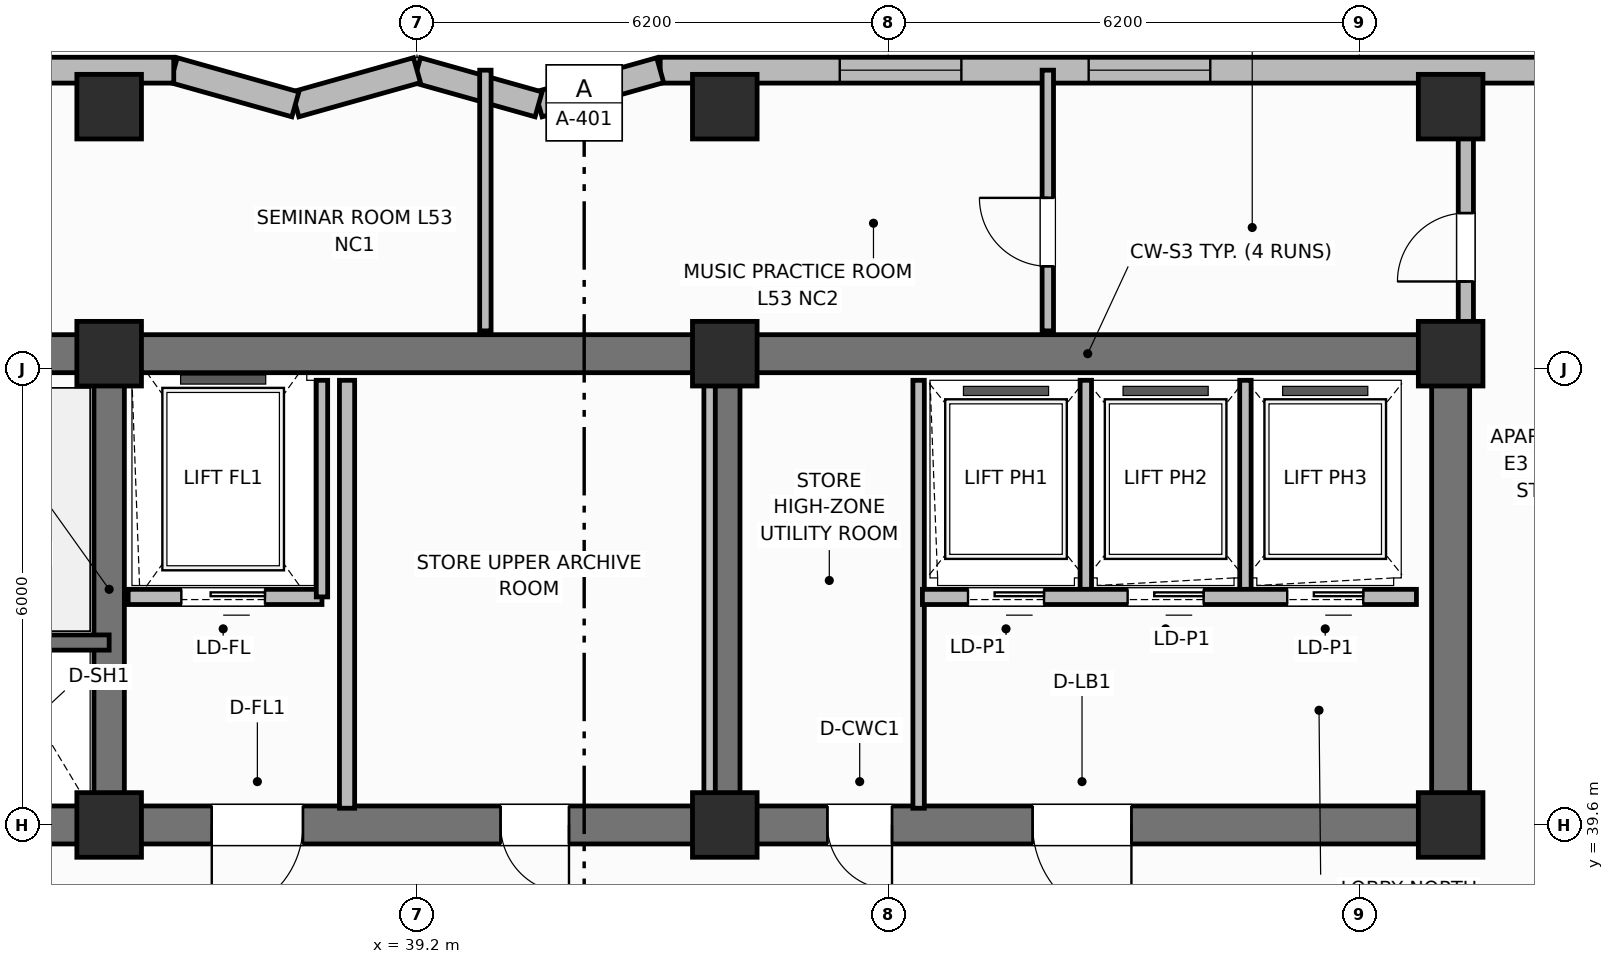
"""IFC4 building model, lengths in metres.
Left out: names, types, materials, properties, quantities, classifications, styles, units other than length and angle.
Written with IfcOpenShell. Run it as: python <this file> out.ifc"""

import sys

from ifc_helpers import new_model, si_unit, direction, frame, frame_2d, origin, origin_2d, place, context, subcontext, project, spatial, rectangle, extrude, element, fill, save


model = new_model("IFC4")
c1 = context("Model", 3, precision=1e-05, world=origin(), true_north=direction((0.0, 1.0)))
c2 = subcontext(c1, "Body", "Model", "MODEL_VIEW")
j1 = project(units=[si_unit("LENGTHUNIT", "METRE"), si_unit("PLANEANGLEUNIT", "RADIAN")], contexts=[c1])
p1 = place(None, origin())
s1 = spatial("IfcSite", under=j1, at=p1, CompositionType="ELEMENT")
p2 = place(p1, origin())
s2 = spatial("IfcBuilding", under=s1, at=p2, CompositionType="ELEMENT")
p3 = place(p2, frame((0.0, 0.0, 214.7)))
s3 = spatial("IfcBuildingStorey", under=s2, at=p3, CompositionType="ELEMENT", Elevation=214.7)
p4 = place(p3, frame((25.6, 45.8, 0.0), z_axis=(0.0, 0.0, 1.0), x_axis=(1.0, 0.0, 0.0)))
e1 = element("IfcWall", 1, at=p4, inside=s3, PredefinedType="SHEAR", context=c2, shape_type="SweptSolid", body=[
    extrude(rectangle(XDim=27.2, YDim=0.5, at=frame_2d((13.6, 0.0))), origin(), (0.0, 0.0, 1.0), 3.7),
])
p5 = place(p3, frame((52.8, 39.85, 0.0), z_axis=(0.0, 0.0, 1.0), x_axis=(0.0, 1.0, 0.0)))
e2 = element("IfcWall", 2, at=p5, inside=s3, PredefinedType="SHEAR", context=c2, shape_type="SweptSolid", body=[
    extrude(rectangle(XDim=5.7, YDim=0.5, at=frame_2d((2.85, 0.0))), origin(), (0.0, 0.0, 1.0), 3.7),
])
p6 = place(p3, frame((52.8, 39.6, 0.0), z_axis=(0.0, 0.0, 1.0), x_axis=(-1.0, 0.0, 0.0)))
e3 = element("IfcWall", 3, at=p6, inside=s3, PredefinedType="SHEAR", context=c2, shape_type="SweptSolid", body=[
    extrude(rectangle(XDim=27.2, YDim=0.5, at=frame_2d((13.6, 0.0))), origin(), (0.0, 0.0, 1.0), 3.7),
])
p7 = place(p6, frame((24.2, 0.0, 0.0)))
e4 = element("IfcOpeningElement", 4, at=p7, cuts=e3, PredefinedType="OPENING", context=c2, shape_type="SweptSolid", body=[
    extrude(rectangle(XDim=1.1, YDim=2.15, at=frame_2d((0.55, 1.075))), frame((0.0, 0.26, 0.0), z_axis=(0.0, -1.0, 0.0), x_axis=(1.0, 0.0, 0.0)), (0.0, 0.0, 1.0), 0.52),
])
p8 = place(p6, frame((15.1, 0.0, 0.0)))
e5 = element("IfcOpeningElement", 5, at=p8, cuts=e3, PredefinedType="OPENING", context=c2, shape_type="SweptSolid", body=[
    extrude(rectangle(XDim=1.2, YDim=2.15, at=frame_2d((0.6, 1.075))), frame((0.0, 0.26, 0.0), z_axis=(0.0, -1.0, 0.0), x_axis=(1.0, 0.0, 0.0)), (0.0, 0.0, 1.0), 0.52),
])
p9 = place(p6, frame((11.6, 0.0, 0.0)))
e6 = element("IfcOpeningElement", 6, at=p9, cuts=e3, PredefinedType="OPENING", context=c2, shape_type="SweptSolid", body=[
    extrude(rectangle(XDim=0.9, YDim=2.1, at=frame_2d((0.45, 1.05))), frame((0.0, 0.26, 0.0), z_axis=(0.0, -1.0, 0.0), x_axis=(1.0, 0.0, 0.0)), (0.0, 0.0, 1.0), 0.52),
])
p10 = place(p6, frame((7.35, 0.0, 0.0)))
e7 = element("IfcOpeningElement", 7, at=p10, cuts=e3, PredefinedType="OPENING", context=c2, shape_type="SweptSolid", body=[
    extrude(rectangle(XDim=0.85, YDim=2.1, at=frame_2d((0.425, 1.05))), frame((0.0, 0.26, 0.0), z_axis=(0.0, -1.0, 0.0), x_axis=(1.0, 0.0, 0.0)), (0.0, 0.0, 1.0), 0.52),
])
p11 = place(p6, frame((4.2, 0.0, 0.0)))
e8 = element("IfcOpeningElement", 8, at=p11, cuts=e3, PredefinedType="OPENING", context=c2, shape_type="SweptSolid", body=[
    extrude(rectangle(XDim=1.3, YDim=2.2, at=frame_2d((0.65, 1.1))), frame((0.0, 0.26, 0.0), z_axis=(0.0, -1.0, 0.0), x_axis=(1.0, 0.0, 0.0)), (0.0, 0.0, 1.0), 0.52),
])
for number, where, z_axis, x_axis in (
    (9, (35.15, 39.85, 0.0), (0.0, 0.0, 1.0), (0.0, 1.0, 0.0)),
    (10, (43.25, 39.85, 0.0), (0.0, 0.0, 1.0), (0.0, 1.0, 0.0)),
):
    element("IfcWall", number, at=place(p3, frame(where, z_axis=z_axis, x_axis=x_axis)), inside=s3, PredefinedType="SHEAR", context=c2, shape_type="SweptSolid", body=[
        extrude(rectangle(XDim=5.7, YDim=0.4, at=frame_2d((2.85, 0.0))), origin(), (0.0, 0.0, 1.0), 3.7),
    ])
for number, where, z_axis, x_axis in (
    (11, (35.15, 39.6, 0.0), (0.0, 0.0, 1.0), (1.0, 0.0, 0.0)),
    (12, (35.15, 45.8, 0.0), (0.0, 0.0, 1.0), (1.0, 0.0, 0.0)),
    (13, (43.25, 39.6, 0.0), (0.0, 0.0, 1.0), (1.0, 0.0, 0.0)),
    (14, (43.25, 45.8, 0.0), (0.0, 0.0, 1.0), (1.0, 0.0, 0.0)),
    (15, (52.8, 39.6, 0.0), (0.0, 0.0, 1.0), (1.0, 0.0, 0.0)),
    (16, (52.8, 45.8, 0.0), (0.0, 0.0, 1.0), (1.0, 0.0, 0.0)),
    (17, (35.15, 49.05, 0.0), (0.0, 0.0, 1.0), (1.0, 0.0, 0.0)),
    (18, (43.25, 49.05, 0.0), (0.0, 0.0, 1.0), (1.0, 0.0, 0.0)),
    (19, (52.8, 49.05, 0.0), (0.0, 0.0, 1.0), (1.0, 0.0, 0.0)),
):
    element("IfcColumn", number, at=place(p3, frame(where, z_axis=z_axis, x_axis=x_axis)), inside=s3, PredefinedType="COLUMN", context=c2, shape_type="SweptSolid", body=[
        extrude(rectangle(XDim=0.85, YDim=0.85, at=origin_2d()), origin(), (0.0, 0.0, 1.0), 3.7),
    ])
p12 = place(p3, frame((58.2, 49.53, 0.0), z_axis=(0.0, 0.0, 1.0), x_axis=(-1.0, 0.0, 0.0)))
e20 = element("IfcWall", 20, at=p12, inside=s3, PredefinedType="SOLIDWALL", context=c2, shape_type="SweptSolid", body=[
    extrude(rectangle(XDim=15.8, YDim=0.34, at=frame_2d((7.9, 0.0))), origin(), (0.0, 0.0, 1.0), 2.72),
])
p13 = place(p12, frame((0.962, 0.0, 0.7)))
e21 = element("IfcOpeningElement", 21, at=p13, cuts=e20, PredefinedType="OPENING", context=c2, shape_type="SweptSolid", body=[
    extrude(rectangle(XDim=1.6, YDim=1.9, at=frame_2d((0.8, 0.95))), frame((0.0, 0.18, 0.0), z_axis=(0.0, -1.0, 0.0), x_axis=(1.0, 0.0, 0.0)), (0.0, 0.0, 1.0), 0.36),
])
p14 = place(p12, frame((8.562, 0.0, 0.7)))
e22 = element("IfcOpeningElement", 22, at=p14, cuts=e20, PredefinedType="OPENING", context=c2, shape_type="SweptSolid", body=[
    extrude(rectangle(XDim=1.6, YDim=1.9, at=frame_2d((0.8, 0.95))), frame((0.0, 0.18, 0.0), z_axis=(0.0, -1.0, 0.0), x_axis=(1.0, 0.0, 0.0)), (0.0, 0.0, 1.0), 0.36),
])
p15 = place(p12, frame((11.837, 0.0, 0.7)))
e23 = element("IfcOpeningElement", 23, at=p15, cuts=e20, PredefinedType="OPENING", context=c2, shape_type="SweptSolid", body=[
    extrude(rectangle(XDim=1.6, YDim=1.9, at=frame_2d((0.8, 0.95))), frame((0.0, 0.18, 0.0), z_axis=(0.0, -1.0, 0.0), x_axis=(1.0, 0.0, 0.0)), (0.0, 0.0, 1.0), 0.36),
])
p16 = place(p3, frame((42.4, 49.53, 0.0), z_axis=(0.0, 0.0, 1.0), x_axis=(-0.962652136636, -0.270741322725, 0.0)))
e24 = element("IfcWall", 24, at=p16, inside=s3, PredefinedType="SOLIDWALL", context=c2, shape_type="SweptSolid", body=[
    extrude(rectangle(XDim=1.662, YDim=0.34, at=frame_2d((0.831, 0.0))), origin(), (0.0, 0.0, 1.0), 2.72),
])
p17 = place(p3, frame((40.8, 49.08, 0.0), z_axis=(0.0, 0.0, 1.0), x_axis=(-0.962662902433, 0.270703040766, 0.0)))
e25 = element("IfcWall", 25, at=p17, inside=s3, PredefinedType="SOLIDWALL", context=c2, shape_type="SweptSolid", body=[
    extrude(rectangle(XDim=1.662, YDim=0.34, at=frame_2d((0.831, 0.0))), origin(), (0.0, 0.0, 1.0), 2.72),
])
p18 = place(p3, frame((39.2, 49.53, 0.0), z_axis=(0.0, 0.0, 1.0), x_axis=(-0.962652136636, -0.270741322725, 0.0)))
e26 = element("IfcWall", 26, at=p18, inside=s3, PredefinedType="SOLIDWALL", context=c2, shape_type="SweptSolid", body=[
    extrude(rectangle(XDim=1.662, YDim=0.34, at=frame_2d((0.831, 0.0))), origin(), (0.0, 0.0, 1.0), 2.72),
])
p19 = place(p3, frame((37.6, 49.08, 0.0), z_axis=(0.0, 0.0, 1.0), x_axis=(-0.962662902433, 0.270703040766, 0.0)))
e27 = element("IfcWall", 27, at=p19, inside=s3, PredefinedType="SOLIDWALL", context=c2, shape_type="SweptSolid", body=[
    extrude(rectangle(XDim=1.662, YDim=0.34, at=frame_2d((0.831, 0.0))), origin(), (0.0, 0.0, 1.0), 2.72),
])
p20 = place(p3, frame((36.0, 49.53, 0.0), z_axis=(0.0, 0.0, 1.0), x_axis=(-1.0, 0.0, 0.0)))
e28 = element("IfcWall", 28, at=p20, inside=s3, PredefinedType="SOLIDWALL", context=c2, shape_type="SweptSolid", body=[
    extrude(rectangle(XDim=15.8, YDim=0.34, at=frame_2d((7.9, 0.0))), origin(), (0.0, 0.0, 1.0), 2.72),
])
p21 = place(p20, frame((2.363, 0.0, 0.7)))
e29 = element("IfcOpeningElement", 29, at=p21, cuts=e28, PredefinedType="OPENING", context=c2, shape_type="SweptSolid", body=[
    extrude(rectangle(XDim=1.6, YDim=1.9, at=frame_2d((0.8, 0.95))), frame((0.0, 0.18, 0.0), z_axis=(0.0, -1.0, 0.0), x_axis=(1.0, 0.0, 0.0)), (0.0, 0.0, 1.0), 0.36),
])
p22 = place(p20, frame((5.288, 0.0, 0.7)))
e30 = element("IfcOpeningElement", 30, at=p22, cuts=e28, PredefinedType="OPENING", context=c2, shape_type="SweptSolid", body=[
    extrude(rectangle(XDim=1.6, YDim=1.9, at=frame_2d((0.8, 0.95))), frame((0.0, 0.18, 0.0), z_axis=(0.0, -1.0, 0.0), x_axis=(1.0, 0.0, 0.0)), (0.0, 0.0, 1.0), 0.36),
])
p23 = place(p20, frame((13.238, 0.0, 0.7)))
e31 = element("IfcOpeningElement", 31, at=p23, cuts=e28, PredefinedType="OPENING", context=c2, shape_type="SweptSolid", body=[
    extrude(rectangle(XDim=1.6, YDim=1.9, at=frame_2d((0.8, 0.95))), frame((0.0, 0.18, 0.0), z_axis=(0.0, -1.0, 0.0), x_axis=(1.0, 0.0, 0.0)), (0.0, 0.0, 1.0), 0.36),
])
p24 = place(p3, frame((35.15, 42.0, 0.0), z_axis=(0.0, 0.0, 1.0), x_axis=(-1.0, 0.0, 0.0)))
e32 = element("IfcWall", 32, at=p24, inside=s3, PredefinedType="SHEAR", context=c2, shape_type="SweptSolid", body=[
    extrude(rectangle(XDim=9.55, YDim=0.2, at=frame_2d((4.775, 0.0))), origin(), (0.0, 0.0, 1.0), 3.7),
])
p25 = place(p24, frame((7.25, 0.0, 0.0)))
e33 = element("IfcOpeningElement", 33, at=p25, cuts=e32, PredefinedType="OPENING", context=c2, shape_type="SweptSolid", body=[
    extrude(rectangle(XDim=1.1, YDim=2.15, at=frame_2d((0.55, 1.075))), frame((0.0, 0.11, 0.0), z_axis=(0.0, -1.0, 0.0), x_axis=(1.0, 0.0, 0.0)), (0.0, 0.0, 1.0), 0.22),
])
p26 = place(p3, frame((37.95, 42.6, 0.0), z_axis=(0.0, 0.0, 1.0), x_axis=(-1.0, 0.0, 0.0)))
e34 = element("IfcWall", 34, at=p26, inside=s3, PredefinedType="PARTITIONING", context=c2, shape_type="SweptSolid", body=[
    extrude(rectangle(XDim=2.55, YDim=0.2, at=frame_2d((1.275, 0.0))), origin(), (0.0, 0.0, 1.0), 2.32),
])
p27 = place(p26, frame((0.75, 0.0, 0.0)))
e35 = element("IfcOpeningElement", 35, at=p27, cuts=e34, PredefinedType="OPENING", context=c2, shape_type="SweptSolid", body=[
    extrude(rectangle(XDim=1.1, YDim=2.15, at=frame_2d((0.55, 1.075))), frame((0.0, 0.11, 0.0), z_axis=(0.0, -1.0, 0.0), x_axis=(1.0, 0.0, 0.0)), (0.0, 0.0, 1.0), 0.22),
])
p28 = place(p3, frame((37.95, 42.6, 0.0), z_axis=(0.0, 0.0, 1.0), x_axis=(0.0, 1.0, 0.0)))
e36 = element("IfcWall", 36, at=p28, inside=s3, PredefinedType="PARTITIONING", context=c2, shape_type="SweptSolid", body=[
    extrude(rectangle(XDim=2.85, YDim=0.15, at=frame_2d((1.425, 0.0))), origin(), (0.0, 0.0, 1.0), 2.55),
])
p29 = place(p3, frame((38.28, 39.82, 0.0), z_axis=(0.0, 0.0, 1.0), x_axis=(0.0, 1.0, 0.0)))
e37 = element("IfcWall", 37, at=p29, inside=s3, PredefinedType="PARTITIONING", context=c2, shape_type="SweptSolid", body=[
    extrude(rectangle(XDim=5.63, YDim=0.2, at=frame_2d((2.815, 0.0))), origin(), (0.0, 0.0, 1.0), 2.55),
])
for number, where, z_axis, x_axis in (
    (38, (43.05, 39.82, 0.0), (0.0, 0.0, 1.0), (0.0, 1.0, 0.0)),
    (39, (45.8, 39.82, 0.0), (0.0, 0.0, 1.0), (0.0, 1.0, 0.0)),
):
    element("IfcWall", number, at=place(p3, frame(where, z_axis=z_axis, x_axis=x_axis)), inside=s3, PredefinedType="PARTITIONING", context=c2, shape_type="SweptSolid", body=[
        extrude(rectangle(XDim=5.63, YDim=0.15, at=frame_2d((2.815, 0.0))), origin(), (0.0, 0.0, 1.0), 2.55),
    ])
for number, where, z_axis, x_axis in (
    (40, (48.0, 42.65, 0.0), (0.0, 0.0, 1.0), (0.0, 1.0, 0.0)),
    (41, (50.1, 42.65, 0.0), (0.0, 0.0, 1.0), (0.0, 1.0, 0.0)),
):
    element("IfcWall", number, at=place(p3, frame(where, z_axis=z_axis, x_axis=x_axis)), inside=s3, PredefinedType="PARTITIONING", context=c2, shape_type="SweptSolid", body=[
        extrude(rectangle(XDim=2.8, YDim=0.15, at=frame_2d((1.4, 0.0))), origin(), (0.0, 0.0, 1.0), 2.55),
    ])
p30 = place(p3, frame((52.35, 42.6, 0.0), z_axis=(0.0, 0.0, 1.0), x_axis=(-1.0, 0.0, 0.0)))
e42 = element("IfcWall", 42, at=p30, inside=s3, PredefinedType="PARTITIONING", context=c2, shape_type="SweptSolid", body=[
    extrude(rectangle(XDim=6.5, YDim=0.2, at=frame_2d((3.25, 0.0))), origin(), (0.0, 0.0, 1.0), 2.55),
])
p31 = place(p30, frame((4.9, 0.0, 0.0)))
e43 = element("IfcOpeningElement", 43, at=p31, cuts=e42, PredefinedType="OPENING", context=c2, shape_type="SweptSolid", body=[
    extrude(rectangle(XDim=1.0, YDim=2.15, at=frame_2d((0.5, 1.075))), frame((0.0, 0.11, 0.0), z_axis=(0.0, -1.0, 0.0), x_axis=(1.0, 0.0, 0.0)), (0.0, 0.0, 1.0), 0.22),
])
p32 = place(p30, frame((2.8, 0.0, 0.0)))
e44 = element("IfcOpeningElement", 44, at=p32, cuts=e42, PredefinedType="OPENING", context=c2, shape_type="SweptSolid", body=[
    extrude(rectangle(XDim=1.0, YDim=2.15, at=frame_2d((0.5, 1.075))), frame((0.0, 0.11, 0.0), z_axis=(0.0, -1.0, 0.0), x_axis=(1.0, 0.0, 0.0)), (0.0, 0.0, 1.0), 0.22),
])
p33 = place(p30, frame((0.7, 0.0, 0.0)))
e45 = element("IfcOpeningElement", 45, at=p33, cuts=e42, PredefinedType="OPENING", context=c2, shape_type="SweptSolid", body=[
    extrude(rectangle(XDim=1.0, YDim=2.15, at=frame_2d((0.5, 1.075))), frame((0.0, 0.11, 0.0), z_axis=(0.0, -1.0, 0.0), x_axis=(1.0, 0.0, 0.0)), (0.0, 0.0, 1.0), 0.22),
])
p34 = place(p3, frame((40.1, 46.1, 0.0), z_axis=(0.0, 0.0, 1.0), x_axis=(0.0, 1.0, 0.0)))
e46 = element("IfcWall", 46, at=p34, inside=s3, PredefinedType="PARTITIONING", context=c2, shape_type="SweptSolid", body=[
    extrude(rectangle(XDim=3.43, YDim=0.15, at=frame_2d((1.715, 0.0))), origin(), (0.0, 0.0, 1.0), 2.55),
])
p35 = place(p3, frame((47.5, 46.1, 0.0), z_axis=(0.0, 0.0, 1.0), x_axis=(0.0, 1.0, 0.0)))
e47 = element("IfcWall", 47, at=p35, inside=s3, PredefinedType="PARTITIONING", context=c2, shape_type="SweptSolid", body=[
    extrude(rectangle(XDim=3.43, YDim=0.15, at=frame_2d((1.715, 0.0))), origin(), (0.0, 0.0, 1.0), 2.55),
])
p36 = place(p35, frame((0.85, 0.0, 0.0)))
e48 = element("IfcOpeningElement", 48, at=p36, cuts=e47, PredefinedType="OPENING", context=c2, shape_type="SweptSolid", body=[
    extrude(rectangle(XDim=0.9, YDim=2.1, at=frame_2d((0.45, 1.05))), frame((0.0, 0.085, 0.0), z_axis=(0.0, -1.0, 0.0), x_axis=(1.0, 0.0, 0.0)), (0.0, 0.0, 1.0), 0.17),
])
p37 = place(p3, frame((53.0, 46.1, 0.0), z_axis=(0.0, 0.0, 1.0), x_axis=(0.0, 1.0, 0.0)))
e49 = element("IfcWall", 49, at=p37, inside=s3, PredefinedType="PARTITIONING", context=c2, shape_type="SweptSolid", body=[
    extrude(rectangle(XDim=2.73, YDim=0.2, at=frame_2d((1.365, 0.0))), origin(), (0.0, 0.0, 1.0), 2.55),
])
p38 = place(p37, frame((0.65, 0.0, 0.0)))
e50 = element("IfcOpeningElement", 50, at=p38, cuts=e49, PredefinedType="OPENING", context=c2, shape_type="SweptSolid", body=[
    extrude(rectangle(XDim=0.9, YDim=2.1, at=frame_2d((0.45, 1.05))), frame((0.0, 0.11, 0.0), z_axis=(0.0, -1.0, 0.0), x_axis=(1.0, 0.0, 0.0)), (0.0, 0.0, 1.0), 0.22),
])
p39 = place(p14, origin())
e51 = element("IfcWindow", 51, at=p39, inside=s3, PartitioningType="SINGLE_PANEL", PredefinedType="WINDOW", context=c2, shape_type="SweptSolid", body=[
    extrude(rectangle(XDim=1.6, YDim=1.9, at=frame_2d((0.8, 0.95))), frame((0.0, 0.03, 0.0), z_axis=(0.0, -1.0, 0.0), x_axis=(1.0, 0.0, 0.0)), (0.0, 0.0, 1.0), 0.06),
])
fill(e22, e51)
p40 = place(p15, origin())
e52 = element("IfcWindow", 52, at=p40, inside=s3, PartitioningType="SINGLE_PANEL", PredefinedType="WINDOW", context=c2, shape_type="SweptSolid", body=[
    extrude(rectangle(XDim=1.6, YDim=1.9, at=frame_2d((0.8, 0.95))), frame((0.0, 0.03, 0.0), z_axis=(0.0, -1.0, 0.0), x_axis=(1.0, 0.0, 0.0)), (0.0, 0.0, 1.0), 0.06),
])
fill(e23, e52)
p41 = place(p27, origin())
e53 = element("IfcDoor", 53, at=p41, inside=s3, OperationType="SLIDING_TO_LEFT", PredefinedType="DOOR", context=c2, shape_type="SweptSolid", body=[
    extrude(rectangle(XDim=1.1, YDim=2.15, at=frame_2d((0.55, 1.075))), frame((0.0, 0.025, 0.0), z_axis=(0.0, -1.0, 0.0), x_axis=(1.0, 0.0, 0.0)), (0.0, 0.0, 1.0), 0.05),
])
fill(e35, e53)
p42 = place(p31, origin())
e54 = element("IfcDoor", 54, at=p42, inside=s3, OperationType="SLIDING_TO_LEFT", PredefinedType="DOOR", context=c2, shape_type="SweptSolid", body=[
    extrude(rectangle(XDim=1.0, YDim=2.15, at=frame_2d((0.5, 1.075))), frame((0.0, 0.025, 0.0), z_axis=(0.0, -1.0, 0.0), x_axis=(1.0, 0.0, 0.0)), (0.0, 0.0, 1.0), 0.05),
])
fill(e43, e54)
p43 = place(p32, origin())
e55 = element("IfcDoor", 55, at=p43, inside=s3, OperationType="SLIDING_TO_LEFT", PredefinedType="DOOR", context=c2, shape_type="SweptSolid", body=[
    extrude(rectangle(XDim=1.0, YDim=2.15, at=frame_2d((0.5, 1.075))), frame((0.0, 0.025, 0.0), z_axis=(0.0, -1.0, 0.0), x_axis=(1.0, 0.0, 0.0)), (0.0, 0.0, 1.0), 0.05),
])
fill(e44, e55)
p44 = place(p33, origin())
e56 = element("IfcDoor", 56, at=p44, inside=s3, OperationType="SLIDING_TO_LEFT", PredefinedType="DOOR", context=c2, shape_type="SweptSolid", body=[
    extrude(rectangle(XDim=1.0, YDim=2.15, at=frame_2d((0.5, 1.075))), frame((0.0, 0.025, 0.0), z_axis=(0.0, -1.0, 0.0), x_axis=(1.0, 0.0, 0.0)), (0.0, 0.0, 1.0), 0.05),
])
fill(e45, e56)
p45 = place(p36, origin())
e57 = element("IfcDoor", 57, at=p45, inside=s3, OperationType="SINGLE_SWING_RIGHT", PredefinedType="DOOR", context=c2, shape_type="SweptSolid", body=[
    extrude(rectangle(XDim=0.9, YDim=2.1, at=frame_2d((0.45, 1.05))), frame((0.0, 0.025, 0.0), z_axis=(0.0, -1.0, 0.0), x_axis=(1.0, 0.0, 0.0)), (0.0, 0.0, 1.0), 0.05),
])
fill(e48, e57)
p46 = place(p38, origin())
e58 = element("IfcDoor", 58, at=p46, inside=s3, OperationType="SINGLE_SWING_LEFT", PredefinedType="DOOR", context=c2, shape_type="SweptSolid", body=[
    extrude(rectangle(XDim=0.9, YDim=2.1, at=frame_2d((0.45, 1.05))), frame((0.0, 0.025, 0.0), z_axis=(0.0, -1.0, 0.0), x_axis=(1.0, 0.0, 0.0)), (0.0, 0.0, 1.0), 0.05),
])
fill(e50, e58)
p47 = place(p8, origin())
e59 = element("IfcDoor", 59, at=p47, inside=s3, OperationType="SINGLE_SWING_RIGHT", PredefinedType="DOOR", context=c2, shape_type="SweptSolid", body=[
    extrude(rectangle(XDim=1.2, YDim=2.15, at=frame_2d((0.6, 1.075))), frame((0.0, 0.025, 0.0), z_axis=(0.0, -1.0, 0.0), x_axis=(1.0, 0.0, 0.0)), (0.0, 0.0, 1.0), 0.05),
])
fill(e5, e59)
p48 = place(p9, origin())
e60 = element("IfcDoor", 60, at=p48, inside=s3, OperationType="SINGLE_SWING_LEFT", PredefinedType="DOOR", context=c2, shape_type="SweptSolid", body=[
    extrude(rectangle(XDim=0.9, YDim=2.1, at=frame_2d((0.45, 1.05))), frame((0.0, 0.025, 0.0), z_axis=(0.0, -1.0, 0.0), x_axis=(1.0, 0.0, 0.0)), (0.0, 0.0, 1.0), 0.05),
])
fill(e6, e60)
p49 = place(p10, origin())
e61 = element("IfcDoor", 61, at=p49, inside=s3, OperationType="SINGLE_SWING_LEFT", PredefinedType="DOOR", context=c2, shape_type="SweptSolid", body=[
    extrude(rectangle(XDim=0.85, YDim=2.1, at=frame_2d((0.425, 1.05))), frame((0.0, 0.025, 0.0), z_axis=(0.0, -1.0, 0.0), x_axis=(1.0, 0.0, 0.0)), (0.0, 0.0, 1.0), 0.05),
])
fill(e7, e61)
p50 = place(p11, origin())
e62 = element("IfcDoor", 62, at=p50, inside=s3, OperationType="SINGLE_SWING_LEFT", PredefinedType="DOOR", context=c2, shape_type="SweptSolid", body=[
    extrude(rectangle(XDim=1.3, YDim=2.2, at=frame_2d((0.65, 1.1))), frame((0.0, 0.025, 0.0), z_axis=(0.0, -1.0, 0.0), x_axis=(1.0, 0.0, 0.0)), (0.0, 0.0, 1.0), 0.05),
])
fill(e8, e62)
save(model, sys.argv[1])
